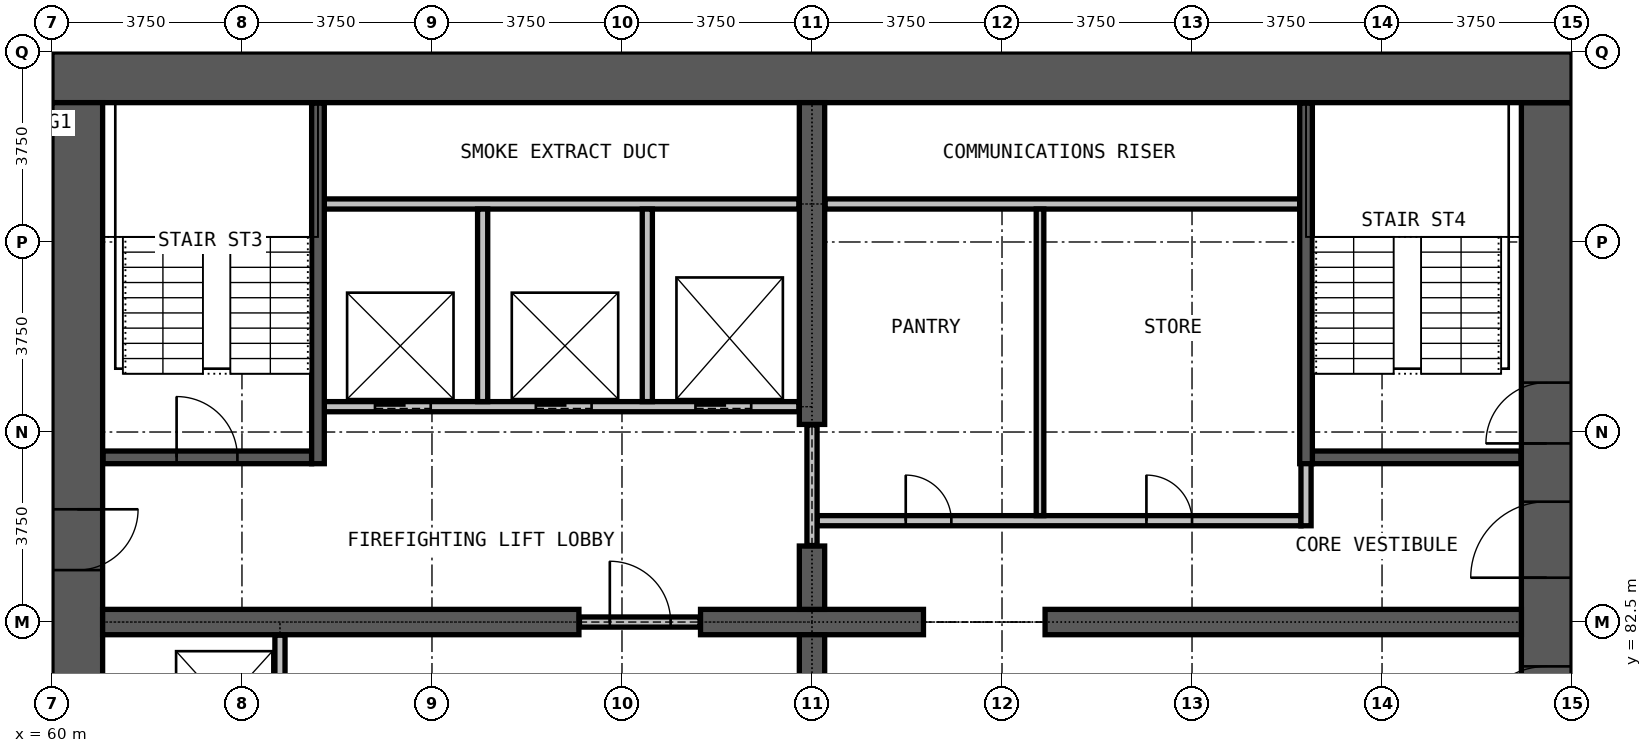
"""IFC4 building model, lengths in metres.
Left out: names, types, materials, properties, quantities, classifications, styles, units other than length and angle.
Written with IfcOpenShell. Run it as: python <this file> out.ifc"""

import sys

from ifc_helpers import new_model, si_unit, direction, frame, frame_2d, origin, place, context, subcontext, project, spatial, rectangle, extrude, element, fill, save


model = new_model("IFC4")
c1 = context("Model", 3, precision=1e-05, world=origin(), true_north=direction((0.0, 1.0)))
c2 = subcontext(c1, "Body", "Model", "MODEL_VIEW")
j1 = project(units=[si_unit("LENGTHUNIT", "METRE"), si_unit("PLANEANGLEUNIT", "RADIAN")], contexts=[c1])
p1 = place(None, origin())
s1 = spatial("IfcSite", under=j1, at=p1, CompositionType="ELEMENT")
p2 = place(p1, origin())
s2 = spatial("IfcBuilding", under=s1, at=p2, CompositionType="ELEMENT")
p3 = place(p2, frame((0.0, 0.0, 72.5)))
s3 = spatial("IfcBuildingStorey", under=s2, at=p3, CompositionType="ELEMENT", Elevation=72.5)
p4 = place(p3, frame((89.5, 72.25, 0.0), z_axis=(0.0, 0.0, 1.0), x_axis=(0.0, 1.0, 0.0)))
e1 = element("IfcWall", 1, at=p4, inside=s3, PredefinedType="SHEAR", context=c2, shape_type="SweptSolid", body=[
    extrude(rectangle(XDim=20.5, YDim=1.0, at=frame_2d((10.25, 0.0))), origin(), (0.0, 0.0, 1.0), 3.3),
])
p5 = place(p4, frame((0.275, 0.0, 0.0)))
e2 = element("IfcOpeningElement", 2, at=p5, cuts=e1, PredefinedType="OPENING", context=c2, shape_type="SweptSolid", body=[
    extrude(rectangle(XDim=1.2, YDim=2.2, at=frame_2d((0.6, 1.1))), frame((0.0, 0.51, 0.0), z_axis=(0.0, -1.0, 0.0), x_axis=(1.0, 0.0, 0.0)), (0.0, 0.0, 1.0), 1.02),
])
p6 = place(p4, frame((13.775, 0.0, 0.0)))
e3 = element("IfcOpeningElement", 3, at=p6, cuts=e1, PredefinedType="OPENING", context=c2, shape_type="SweptSolid", body=[
    extrude(rectangle(XDim=1.2, YDim=2.2, at=frame_2d((0.6, 1.1))), frame((0.0, 0.51, 0.0), z_axis=(0.0, -1.0, 0.0), x_axis=(1.0, 0.0, 0.0)), (0.0, 0.0, 1.0), 1.02),
])
p7 = place(p4, frame((7.875, 0.0, 0.0)))
e4 = element("IfcOpeningElement", 4, at=p7, cuts=e1, PredefinedType="OPENING", context=c2, shape_type="SweptSolid", body=[
    extrude(rectangle(XDim=1.5, YDim=2.2, at=frame_2d((0.75, 1.1))), frame((0.0, 0.51, 0.0), z_axis=(0.0, -1.0, 0.0), x_axis=(1.0, 0.0, 0.0)), (0.0, 0.0, 1.0), 1.02),
])
p8 = place(p4, frame((11.125, 0.0, 0.0)))
e5 = element("IfcOpeningElement", 5, at=p8, cuts=e1, PredefinedType="OPENING", context=c2, shape_type="SweptSolid", body=[
    extrude(rectangle(XDim=1.5, YDim=2.2, at=frame_2d((0.75, 1.1))), frame((0.0, 0.51, 0.0), z_axis=(0.0, -1.0, 0.0), x_axis=(1.0, 0.0, 0.0)), (0.0, 0.0, 1.0), 1.02),
])
p9 = place(p3, frame((90.0, 93.25, 0.0), z_axis=(0.0, 0.0, 1.0), x_axis=(-1.0, 0.0, 0.0)))
e6 = element("IfcWall", 6, at=p9, inside=s3, PredefinedType="SHEAR", context=c2, shape_type="SweptSolid", body=[
    extrude(rectangle(XDim=30.0, YDim=1.0, at=frame_2d((15.0, 0.0))), origin(), (0.0, 0.0, 1.0), 3.3),
])
p10 = place(p3, frame((60.5, 92.75, 0.0), z_axis=(0.0, 0.0, 1.0), x_axis=(0.0, -1.0, 0.0)))
e7 = element("IfcWall", 7, at=p10, inside=s3, PredefinedType="SHEAR", context=c2, shape_type="SweptSolid", body=[
    extrude(rectangle(XDim=20.5, YDim=1.0, at=frame_2d((10.25, 0.0))), origin(), (0.0, 0.0, 1.0), 3.3),
])
p11 = place(p10, frame((19.025, 0.0, 0.0)))
e8 = element("IfcOpeningElement", 8, at=p11, cuts=e7, PredefinedType="OPENING", context=c2, shape_type="SweptSolid", body=[
    extrude(rectangle(XDim=1.2, YDim=2.2, at=frame_2d((0.6, 1.1))), frame((0.0, 0.51, 0.0), z_axis=(0.0, -1.0, 0.0), x_axis=(1.0, 0.0, 0.0)), (0.0, 0.0, 1.0), 1.02),
])
p12 = place(p10, frame((8.025, 0.0, 0.0)))
e9 = element("IfcOpeningElement", 9, at=p12, cuts=e7, PredefinedType="OPENING", context=c2, shape_type="SweptSolid", body=[
    extrude(rectangle(XDim=1.2, YDim=2.2, at=frame_2d((0.6, 1.1))), frame((0.0, 0.51, 0.0), z_axis=(0.0, -1.0, 0.0), x_axis=(1.0, 0.0, 0.0)), (0.0, 0.0, 1.0), 1.02),
])
p13 = place(p3, frame((61.0, 82.5, 0.0), z_axis=(0.0, 0.0, 1.0), x_axis=(1.0, 0.0, 0.0)))
e10 = element("IfcWall", 10, at=p13, inside=s3, PredefinedType="SHEAR", context=c2, shape_type="SweptSolid", body=[
    extrude(rectangle(XDim=9.4, YDim=0.5, at=frame_2d((4.7, 0.0))), origin(), (0.0, 0.0, 1.0), 3.3),
])
p14 = place(p3, frame((72.8, 82.5, 0.0), z_axis=(0.0, 0.0, 1.0), x_axis=(1.0, 0.0, 0.0)))
e11 = element("IfcWall", 11, at=p14, inside=s3, PredefinedType="SHEAR", context=c2, shape_type="SweptSolid", body=[
    extrude(rectangle(XDim=4.4, YDim=0.5, at=frame_2d((2.2, 0.0))), origin(), (0.0, 0.0, 1.0), 3.3),
])
p15 = place(p3, frame((79.6, 82.5, 0.0), z_axis=(0.0, 0.0, 1.0), x_axis=(1.0, 0.0, 0.0)))
e12 = element("IfcWall", 12, at=p15, inside=s3, PredefinedType="SHEAR", context=c2, shape_type="SweptSolid", body=[
    extrude(rectangle(XDim=9.4, YDim=0.5, at=frame_2d((4.7, 0.0))), origin(), (0.0, 0.0, 1.0), 3.3),
])
for number, where, z_axis, x_axis in (
    (13, (75.0, 81.0, 0.0), (0.0, 0.0, 1.0), (0.0, 1.0, 0.0)),
    (14, (75.0, 82.75, 0.0), (0.0, 0.0, 1.0), (0.0, 1.0, 0.0)),
):
    element("IfcWall", number, at=place(p3, frame(where, z_axis=z_axis, x_axis=x_axis)), inside=s3, PredefinedType="SHEAR", context=c2, shape_type="SweptSolid", body=[
        extrude(rectangle(XDim=1.25, YDim=0.5, at=frame_2d((0.625, 0.0))), origin(), (0.0, 0.0, 1.0), 3.3),
    ])
p16 = place(p3, frame((75.0, 86.4, 0.0), z_axis=(0.0, 0.0, 1.0), x_axis=(0.0, 1.0, 0.0)))
e15 = element("IfcWall", 15, at=p16, inside=s3, PredefinedType="SHEAR", context=c2, shape_type="SweptSolid", body=[
    extrude(rectangle(XDim=6.35, YDim=0.5, at=frame_2d((3.175, 0.0))), origin(), (0.0, 0.0, 1.0), 3.3),
])
p17 = place(p3, frame((70.41, 82.5, 0.0), z_axis=(0.0, 0.0, 1.0), x_axis=(1.0, 0.0, 0.0)))
e16 = element("IfcWall", 16, at=p17, inside=s3, PredefinedType="PARTITIONING", context=c2, shape_type="SweptSolid", body=[
    extrude(rectangle(XDim=2.38, YDim=0.2, at=frame_2d((1.19, 0.0))), origin(), (0.0, 0.0, 1.0), 2.4),
])
p18 = place(p17, frame((0.6, 0.0, 0.0)))
e17 = element("IfcOpeningElement", 17, at=p18, cuts=e16, PredefinedType="OPENING", context=c2, shape_type="SweptSolid", body=[
    extrude(rectangle(XDim=1.2, YDim=2.2, at=frame_2d((0.6, 1.1))), frame((0.0, 0.11, 0.0), z_axis=(0.0, -1.0, 0.0), x_axis=(1.0, 0.0, 0.0)), (0.0, 0.0, 1.0), 0.22),
])
p19 = place(p3, frame((75.1, 84.5, 0.0), z_axis=(0.0, 0.0, 1.0), x_axis=(1.0, 0.0, 0.0)))
e18 = element("IfcWall", 18, at=p19, inside=s3, PredefinedType="PARTITIONING", context=c2, shape_type="SweptSolid", body=[
    extrude(rectangle(XDim=9.55, YDim=0.2, at=frame_2d((4.775, 0.0))), origin(), (0.0, 0.0, 1.0), 3.0),
])
p20 = place(p19, frame((1.75, 0.0, 0.0)))
e19 = element("IfcOpeningElement", 19, at=p20, cuts=e18, PredefinedType="OPENING", context=c2, shape_type="SweptSolid", body=[
    extrude(rectangle(XDim=0.9, YDim=2.2, at=frame_2d((0.45, 1.1))), frame((0.0, 0.11, 0.0), z_axis=(0.0, -1.0, 0.0), x_axis=(1.0, 0.0, 0.0)), (0.0, 0.0, 1.0), 0.22),
])
p21 = place(p19, frame((6.5, 0.0, 0.0)))
e20 = element("IfcOpeningElement", 20, at=p21, cuts=e18, PredefinedType="OPENING", context=c2, shape_type="SweptSolid", body=[
    extrude(rectangle(XDim=0.9, YDim=2.2, at=frame_2d((0.45, 1.1))), frame((0.0, 0.11, 0.0), z_axis=(0.0, -1.0, 0.0), x_axis=(1.0, 0.0, 0.0)), (0.0, 0.0, 1.0), 0.22),
])
p22 = place(p3, frame((75.26, 90.75, 0.0), z_axis=(0.0, 0.0, 1.0), x_axis=(1.0, 0.0, 0.0)))
e21 = element("IfcWall", 21, at=p22, inside=s3, PredefinedType="PARTITIONING", context=c2, shape_type="SweptSolid", body=[
    extrude(rectangle(XDim=9.365, YDim=0.2, at=frame_2d((4.683, 0.0))), origin(), (0.0, 0.0, 1.0), 3.0),
])
p23 = place(p3, frame((75.0, 84.01, 0.0), z_axis=(0.0, 0.0, 1.0), x_axis=(0.0, 1.0, 0.0)))
e22 = element("IfcWall", 22, at=p23, inside=s3, PredefinedType="PARTITIONING", context=c2, shape_type="SweptSolid", body=[
    extrude(rectangle(XDim=2.38, YDim=0.2, at=frame_2d((1.19, 0.0))), origin(), (0.0, 0.0, 1.0), 2.4),
])
p24 = place(p3, frame((84.75, 84.4, 0.0), z_axis=(0.0, 0.0, 1.0), x_axis=(0.0, 1.0, 0.0)))
e23 = element("IfcWall", 23, at=p24, inside=s3, PredefinedType="PARTITIONING", context=c2, shape_type="SweptSolid", body=[
    extrude(rectangle(XDim=1.475, YDim=0.2, at=frame_2d((0.738, 0.0))), origin(), (0.0, 0.0, 1.0), 3.0),
])
p25 = place(p3, frame((79.5, 84.6, 0.0), z_axis=(0.0, 0.0, 1.0), x_axis=(0.0, 1.0, 0.0)))
e24 = element("IfcWall", 24, at=p25, inside=s3, PredefinedType="PARTITIONING", context=c2, shape_type="SweptSolid", body=[
    extrude(rectangle(XDim=6.05, YDim=0.15, at=frame_2d((3.025, 0.0))), origin(), (0.0, 0.0, 1.0), 3.0),
])
p26 = place(p3, frame((65.375, 86.75, 0.0), z_axis=(0.0, 0.0, 1.0), x_axis=(1.0, 0.0, 0.0)))
e25 = element("IfcWall", 25, at=p26, inside=s3, PredefinedType="PARTITIONING", context=c2, shape_type="SweptSolid", body=[
    extrude(rectangle(XDim=9.365, YDim=0.2, at=frame_2d((4.683, 0.0))), origin(), (0.0, 0.0, 1.0), 3.0),
])
p27 = place(p26, frame((1.0, 0.0, 0.0)))
e26 = element("IfcOpeningElement", 26, at=p27, cuts=e25, PredefinedType="OPENING", context=c2, shape_type="SweptSolid", body=[
    extrude(rectangle(XDim=1.1, YDim=2.2, at=frame_2d((0.55, 1.1))), frame((0.0, 0.11, 0.0), z_axis=(0.0, -1.0, 0.0), x_axis=(1.0, 0.0, 0.0)), (0.0, 0.0, 1.0), 0.22),
])
p28 = place(p26, frame((4.175, 0.0, 0.0)))
e27 = element("IfcOpeningElement", 27, at=p28, cuts=e25, PredefinedType="OPENING", context=c2, shape_type="SweptSolid", body=[
    extrude(rectangle(XDim=1.1, YDim=2.2, at=frame_2d((0.55, 1.1))), frame((0.0, 0.11, 0.0), z_axis=(0.0, -1.0, 0.0), x_axis=(1.0, 0.0, 0.0)), (0.0, 0.0, 1.0), 0.22),
])
p29 = place(p26, frame((7.325, 0.0, 0.0)))
e28 = element("IfcOpeningElement", 28, at=p29, cuts=e25, PredefinedType="OPENING", context=c2, shape_type="SweptSolid", body=[
    extrude(rectangle(XDim=1.1, YDim=2.2, at=frame_2d((0.55, 1.1))), frame((0.0, 0.11, 0.0), z_axis=(0.0, -1.0, 0.0), x_axis=(1.0, 0.0, 0.0)), (0.0, 0.0, 1.0), 0.22),
])
p30 = place(p3, frame((65.375, 90.75, 0.0), z_axis=(0.0, 0.0, 1.0), x_axis=(1.0, 0.0, 0.0)))
e29 = element("IfcWall", 29, at=p30, inside=s3, PredefinedType="PARTITIONING", context=c2, shape_type="SweptSolid", body=[
    extrude(rectangle(XDim=9.365, YDim=0.2, at=frame_2d((4.683, 0.0))), origin(), (0.0, 0.0, 1.0), 3.0),
])
p31 = place(p3, frame((64.5, 79.375, 0.0), z_axis=(0.0, 0.0, 1.0), x_axis=(0.0, 1.0, 0.0)))
e30 = element("IfcWall", 30, at=p31, inside=s3, PredefinedType="PARTITIONING", context=c2, shape_type="SweptSolid", body=[
    extrude(rectangle(XDim=2.865, YDim=0.2, at=frame_2d((1.433, 0.0))), origin(), (0.0, 0.0, 1.0), 3.0),
])
for number, where, z_axis, x_axis in (
    (31, (68.5, 86.85, 0.0), (0.0, 0.0, 1.0), (0.0, 1.0, 0.0)),
    (32, (71.75, 86.85, 0.0), (0.0, 0.0, 1.0), (0.0, 1.0, 0.0)),
):
    element("IfcWall", number, at=place(p3, frame(where, z_axis=z_axis, x_axis=x_axis)), inside=s3, PredefinedType="PARTITIONING", context=c2, shape_type="SweptSolid", body=[
        extrude(rectangle(XDim=3.8, YDim=0.2, at=frame_2d((1.9, 0.0))), origin(), (0.0, 0.0, 1.0), 3.0),
    ])
p32 = place(p3, frame((61.01, 85.75, 0.0), z_axis=(0.0, 0.0, 1.0), x_axis=(1.0, 0.0, 0.0)))
e33 = element("IfcWall", 33, at=p32, inside=s3, PredefinedType="PARTITIONING", context=c2, shape_type="SweptSolid", body=[
    extrude(rectangle(XDim=4.115, YDim=0.25, at=frame_2d((2.058, 0.0))), origin(), (0.0, 0.0, 1.0), 3.0),
])
p33 = place(p32, frame((1.45, 0.0, 0.0)))
e34 = element("IfcOpeningElement", 34, at=p33, cuts=e33, PredefinedType="OPENING", context=c2, shape_type="SweptSolid", body=[
    extrude(rectangle(XDim=1.2, YDim=2.2, at=frame_2d((0.6, 1.1))), frame((0.0, 0.135, 0.0), z_axis=(0.0, -1.0, 0.0), x_axis=(1.0, 0.0, 0.0)), (0.0, 0.0, 1.0), 0.27),
])
p34 = place(p3, frame((84.875, 85.75, 0.0), z_axis=(0.0, 0.0, 1.0), x_axis=(1.0, 0.0, 0.0)))
e35 = element("IfcWall", 35, at=p34, inside=s3, PredefinedType="PARTITIONING", context=c2, shape_type="SweptSolid", body=[
    extrude(rectangle(XDim=4.115, YDim=0.25, at=frame_2d((2.058, 0.0))), origin(), (0.0, 0.0, 1.0), 3.0),
])
for number, where, z_axis, x_axis in (
    (36, (65.25, 85.625, 0.0), (0.0, 0.0, 1.0), (0.0, 1.0, 0.0)),
    (37, (84.75, 85.625, 0.0), (0.0, 0.0, 1.0), (0.0, 1.0, 0.0)),
):
    element("IfcWall", number, at=place(p3, frame(where, z_axis=z_axis, x_axis=x_axis)), inside=s3, PredefinedType="PARTITIONING", context=c2, shape_type="SweptSolid", body=[
        extrude(rectangle(XDim=7.115, YDim=0.25, at=frame_2d((3.558, 0.0))), origin(), (0.0, 0.0, 1.0), 3.0),
    ])
p35 = place(p27, origin())
e38 = element("IfcDoor", 38, at=p35, inside=s3, OperationType="DOUBLE_DOOR_SLIDING", PredefinedType="DOOR", context=c2, shape_type="SweptSolid", body=[
    extrude(rectangle(XDim=1.1, YDim=2.2, at=frame_2d((0.55, 1.1))), frame((0.0, 0.025, 0.0), z_axis=(0.0, -1.0, 0.0), x_axis=(1.0, 0.0, 0.0)), (0.0, 0.0, 1.0), 0.05),
])
fill(e26, e38)
p36 = place(p28, origin())
e39 = element("IfcDoor", 39, at=p36, inside=s3, OperationType="DOUBLE_DOOR_SLIDING", PredefinedType="DOOR", context=c2, shape_type="SweptSolid", body=[
    extrude(rectangle(XDim=1.1, YDim=2.2, at=frame_2d((0.55, 1.1))), frame((0.0, 0.025, 0.0), z_axis=(0.0, -1.0, 0.0), x_axis=(1.0, 0.0, 0.0)), (0.0, 0.0, 1.0), 0.05),
])
fill(e27, e39)
p37 = place(p29, origin())
e40 = element("IfcDoor", 40, at=p37, inside=s3, OperationType="DOUBLE_DOOR_SLIDING", PredefinedType="DOOR", context=c2, shape_type="SweptSolid", body=[
    extrude(rectangle(XDim=1.1, YDim=2.2, at=frame_2d((0.55, 1.1))), frame((0.0, 0.025, 0.0), z_axis=(0.0, -1.0, 0.0), x_axis=(1.0, 0.0, 0.0)), (0.0, 0.0, 1.0), 0.05),
])
fill(e28, e40)
p38 = place(p18, origin())
e41 = element("IfcDoor", 41, at=p38, inside=s3, OperationType="SINGLE_SWING_LEFT", PredefinedType="DOOR", context=c2, shape_type="SweptSolid", body=[
    extrude(rectangle(XDim=1.2, YDim=2.2, at=frame_2d((0.6, 1.1))), frame((0.0, 0.025, 0.0), z_axis=(0.0, -1.0, 0.0), x_axis=(1.0, 0.0, 0.0)), (0.0, 0.0, 1.0), 0.05),
])
fill(e17, e41)
p39 = place(p33, origin())
e42 = element("IfcDoor", 42, at=p39, inside=s3, OperationType="SINGLE_SWING_LEFT", PredefinedType="DOOR", context=c2, shape_type="SweptSolid", body=[
    extrude(rectangle(XDim=1.2, YDim=2.2, at=frame_2d((0.6, 1.1))), frame((0.0, 0.025, 0.0), z_axis=(0.0, -1.0, 0.0), x_axis=(1.0, 0.0, 0.0)), (0.0, 0.0, 1.0), 0.05),
])
fill(e34, e42)
p40 = place(p6, origin())
e43 = element("IfcDoor", 43, at=p40, inside=s3, OperationType="SINGLE_SWING_RIGHT", PredefinedType="DOOR", context=c2, shape_type="SweptSolid", body=[
    extrude(rectangle(XDim=1.2, YDim=2.2, at=frame_2d((0.6, 1.1))), frame((0.0, 0.025, 0.0), z_axis=(0.0, -1.0, 0.0), x_axis=(1.0, 0.0, 0.0)), (0.0, 0.0, 1.0), 0.05),
])
fill(e3, e43)
p41 = place(p7, origin())
e44 = element("IfcDoor", 44, at=p41, inside=s3, OperationType="DOUBLE_DOOR_SINGLE_SWING", PredefinedType="DOOR", context=c2, shape_type="SweptSolid", body=[
    extrude(rectangle(XDim=1.5, YDim=2.2, at=frame_2d((0.75, 1.1))), frame((0.0, 0.025, 0.0), z_axis=(0.0, -1.0, 0.0), x_axis=(1.0, 0.0, 0.0)), (0.0, 0.0, 1.0), 0.05),
])
fill(e4, e44)
p42 = place(p12, origin())
e45 = element("IfcDoor", 45, at=p42, inside=s3, OperationType="SINGLE_SWING_LEFT", PredefinedType="DOOR", context=c2, shape_type="SweptSolid", body=[
    extrude(rectangle(XDim=1.2, YDim=2.2, at=frame_2d((0.6, 1.1))), frame((0.0, 0.025, 0.0), z_axis=(0.0, -1.0, 0.0), x_axis=(1.0, 0.0, 0.0)), (0.0, 0.0, 1.0), 0.05),
])
fill(e9, e45)
p43 = place(p8, origin())
e46 = element("IfcDoor", 46, at=p43, inside=s3, OperationType="DOUBLE_DOOR_SINGLE_SWING", PredefinedType="DOOR", context=c2, shape_type="SweptSolid", body=[
    extrude(rectangle(XDim=1.5, YDim=2.2, at=frame_2d((0.75, 1.1))), frame((0.0, 0.025, 0.0), z_axis=(0.0, -1.0, 0.0), x_axis=(1.0, 0.0, 0.0)), (0.0, 0.0, 1.0), 0.05),
])
fill(e5, e46)
p44 = place(p20, origin())
e47 = element("IfcDoor", 47, at=p44, inside=s3, OperationType="SINGLE_SWING_LEFT", PredefinedType="DOOR", context=c2, shape_type="SweptSolid", body=[
    extrude(rectangle(XDim=0.9, YDim=2.2, at=frame_2d((0.45, 1.1))), frame((0.0, 0.025, 0.0), z_axis=(0.0, -1.0, 0.0), x_axis=(1.0, 0.0, 0.0)), (0.0, 0.0, 1.0), 0.05),
])
fill(e19, e47)
p45 = place(p21, origin())
e48 = element("IfcDoor", 48, at=p45, inside=s3, OperationType="SINGLE_SWING_LEFT", PredefinedType="DOOR", context=c2, shape_type="SweptSolid", body=[
    extrude(rectangle(XDim=0.9, YDim=2.2, at=frame_2d((0.45, 1.1))), frame((0.0, 0.025, 0.0), z_axis=(0.0, -1.0, 0.0), x_axis=(1.0, 0.0, 0.0)), (0.0, 0.0, 1.0), 0.05),
])
fill(e20, e48)
save(model, sys.argv[1])
